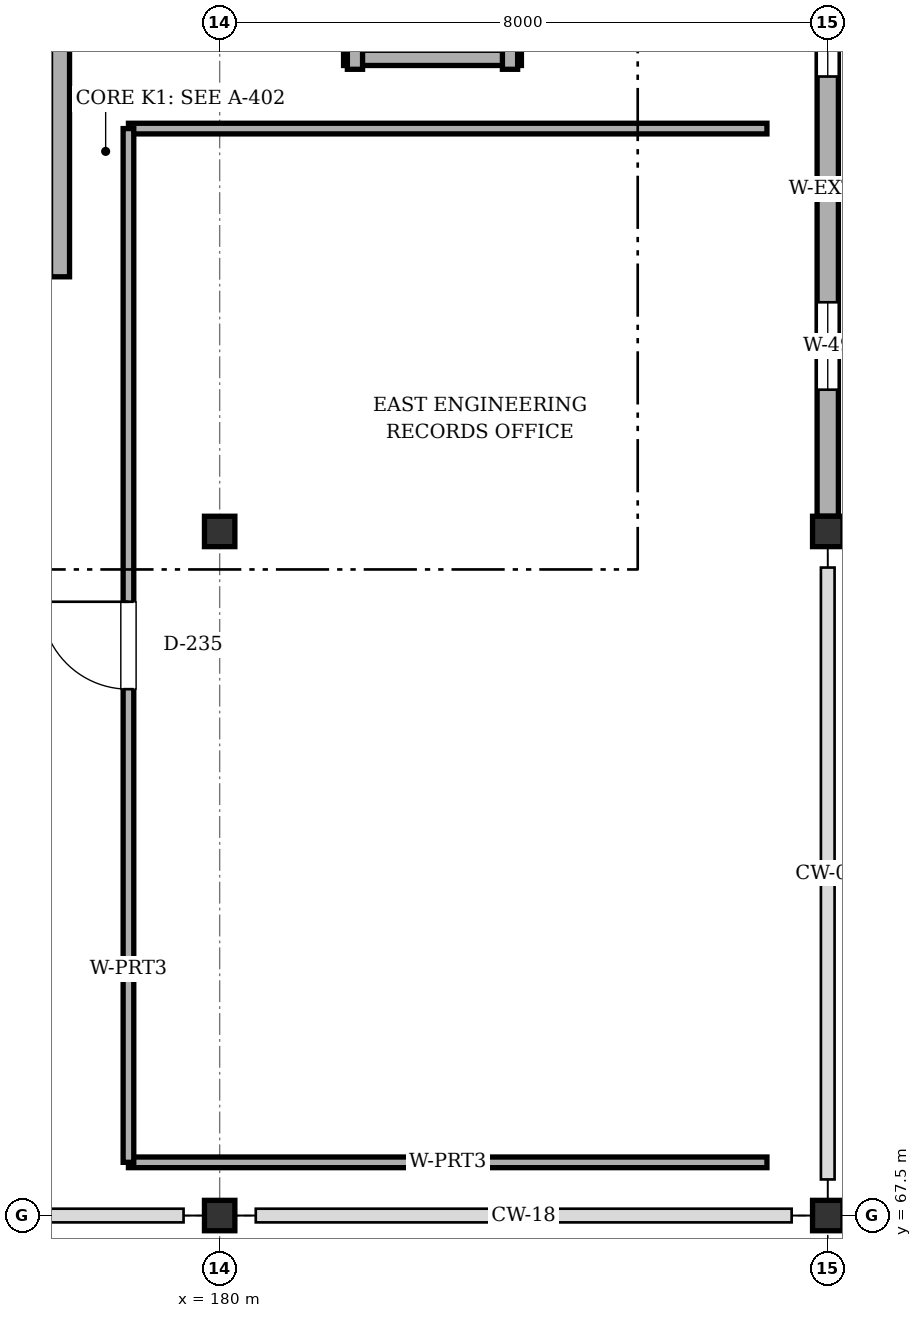
"""IFC4 building model, lengths in metres.
Left out: names, types, materials, properties, quantities, classifications, styles, units other than length and angle.
Written with IfcOpenShell. Run it as: python <this file> out.ifc"""

import sys

from ifc_helpers import new_model, si_unit, direction, frame, frame_2d, origin, origin_2d, place, context, subcontext, project, spatial, rectangle, i_section, extrude, element, fill, save


model = new_model("IFC4")
c1 = context("Model", 3, precision=1e-05, world=origin(), true_north=direction((0.0, 1.0)))
c2 = subcontext(c1, "Body", "Model", "MODEL_VIEW")
j1 = project(units=[si_unit("LENGTHUNIT", "METRE"), si_unit("PLANEANGLEUNIT", "RADIAN")], contexts=[c1])
p1 = place(None, origin())
s1 = spatial("IfcSite", under=j1, at=p1, CompositionType="ELEMENT")
p2 = place(p1, origin())
s2 = spatial("IfcBuilding", under=s1, at=p2, CompositionType="ELEMENT")
p3 = place(p2, frame((0.0, 0.0, 14.4)))
s3 = spatial("IfcBuildingStorey", under=s2, at=p3, CompositionType="ELEMENT", Elevation=14.4)
for number, where, z_axis, x_axis in (
    (1, (180.0, 67.5, 0.0), (0.0, 0.0, 1.0), (1.0, 0.0, 0.0)),
    (2, (180.0, 76.5, 0.0), (0.0, 0.0, 1.0), (1.0, 0.0, 0.0)),
    (3, (188.0, 67.5, 0.0), (0.0, 0.0, 1.0), (1.0, 0.0, 0.0)),
    (4, (188.0, 76.5, 0.0), (0.0, 0.0, 1.0), (1.0, 0.0, 0.0)),
):
    element("IfcColumn", number, at=place(p3, frame(where, z_axis=z_axis, x_axis=x_axis)), inside=s3, PredefinedType="COLUMN", context=c2, shape_type="SweptSolid", body=[
        extrude(i_section(OverallWidth=0.4, OverallDepth=0.4, WebThickness=0.013, FlangeThickness=0.021, FilletRadius=0.022, at=origin_2d()), origin(), (0.0, 0.0, 1.0), 3.2),
    ])
p4 = place(p3, frame((188.0, 85.3, 0.0), z_axis=(0.0, 0.0, 1.0), x_axis=(0.0, -1.0, 0.0)))
e5 = element("IfcWall", 5, at=p4, inside=s3, PredefinedType="SOLIDWALL", context=c2, shape_type="SweptSolid", body=[
    extrude(rectangle(XDim=8.6, YDim=0.28, at=frame_2d((4.3, 0.0))), origin(), (0.0, 0.0, 1.0), 2.485),
])
p5 = place(p4, frame((1.665, 0.0, 0.9)))
e6 = element("IfcOpeningElement", 6, at=p5, cuts=e5, PredefinedType="OPENING", context=c2, shape_type="SweptSolid", body=[
    extrude(rectangle(XDim=1.15, YDim=1.45, at=frame_2d((0.575, 0.725))), frame((0.0, 0.15, 0.0), z_axis=(0.0, -1.0, 0.0), x_axis=(1.0, 0.0, 0.0)), (0.0, 0.0, 1.0), 0.3),
])
p6 = place(p4, frame((5.785, 0.0, 0.9)))
e7 = element("IfcOpeningElement", 7, at=p6, cuts=e5, PredefinedType="OPENING", context=c2, shape_type="SweptSolid", body=[
    extrude(rectangle(XDim=1.15, YDim=1.45, at=frame_2d((0.575, 0.725))), frame((0.0, 0.15, 0.0), z_axis=(0.0, -1.0, 0.0), x_axis=(1.0, 0.0, 0.0)), (0.0, 0.0, 1.0), 0.3),
])
p7 = place(p3, frame((181.63, 82.73, 0.0), z_axis=(0.0, 0.0, 1.0), x_axis=(1.0, 0.0, 0.0)))
e8 = element("IfcWall", 8, at=p7, inside=s3, PredefinedType="SOLIDWALL", context=c2, shape_type="SweptSolid", body=[
    extrude(rectangle(XDim=2.34, YDim=0.2, at=frame_2d((1.17, 0.0))), origin(), (0.0, 0.0, 1.0), 2.975),
])
for number, where, z_axis, x_axis in (
    (9, (181.78, 85.42, 0.0), (0.0, 0.0, 1.0), (0.0, -1.0, 0.0)),
    (10, (183.82, 82.58, 0.0), (0.0, 0.0, 1.0), (0.0, 1.0, 0.0)),
):
    element("IfcWall", number, at=place(p3, frame(where, z_axis=z_axis, x_axis=x_axis)), inside=s3, PredefinedType="SOLIDWALL", context=c2, shape_type="SweptSolid", body=[
        extrude(rectangle(XDim=2.84, YDim=0.2, at=frame_2d((1.42, 0.0))), origin(), (0.0, 0.0, 1.0), 2.535),
    ])
p8 = place(p3, frame((187.2, 68.2, 0.0), z_axis=(0.0, 0.0, 1.0), x_axis=(-1.0, 0.0, 0.0)))
e11 = element("IfcWall", 11, at=p8, inside=s3, PredefinedType="PARTITIONING", context=c2, shape_type="SweptSolid", body=[
    extrude(rectangle(XDim=8.4, YDim=0.14, at=frame_2d((4.2, 0.0))), origin(), (0.0, 0.0, 1.0), 2.485),
])
p9 = place(p3, frame((178.8, 81.8, 0.0), z_axis=(0.0, 0.0, 1.0), x_axis=(1.0, 0.0, 0.0)))
e12 = element("IfcWall", 12, at=p9, inside=s3, PredefinedType="PARTITIONING", context=c2, shape_type="SweptSolid", body=[
    extrude(rectangle(XDim=8.4, YDim=0.14, at=frame_2d((4.2, 0.0))), origin(), (0.0, 0.0, 1.0), 2.515),
])
p10 = place(p3, frame((178.8, 68.2, 0.0), z_axis=(0.0, 0.0, 1.0), x_axis=(0.0, 1.0, 0.0)))
e13 = element("IfcWall", 13, at=p10, inside=s3, PredefinedType="PARTITIONING", context=c2, shape_type="SweptSolid", body=[
    extrude(rectangle(XDim=13.6, YDim=0.14, at=frame_2d((6.8, 0.0))), origin(), (0.0, 0.0, 1.0), 2.505),
])
p11 = place(p10, frame((6.225, 0.0, 0.0)))
e14 = element("IfcOpeningElement", 14, at=p11, cuts=e13, PredefinedType="OPENING", context=c2, shape_type="SweptSolid", body=[
    extrude(rectangle(XDim=1.15, YDim=2.1, at=frame_2d((0.575, 1.05))), frame((0.0, 0.08, 0.0), z_axis=(0.0, -1.0, 0.0), x_axis=(1.0, 0.0, 0.0)), (0.0, 0.0, 1.0), 0.16),
])
p12 = place(p3, frame((177.9, 84.05, 0.0), z_axis=(0.0, 0.0, 1.0), x_axis=(0.0, -1.0, 0.0)))
e15 = element("IfcWall", 15, at=p12, inside=s3, PredefinedType="SOLIDWALL", context=c2, shape_type="SweptSolid", body=[
    extrude(rectangle(XDim=4.2, YDim=0.25, at=frame_2d((2.1, 0.0))), origin(), (0.0, 0.0, 1.0), 2.975),
])
p13 = place(p5, origin())
e16 = element("IfcWindow", 16, at=p13, inside=s3, PartitioningType="SINGLE_PANEL", PredefinedType="WINDOW", context=c2, shape_type="SweptSolid", body=[
    extrude(rectangle(XDim=1.15, YDim=1.45, at=frame_2d((0.575, 0.725))), frame((0.0, 0.03, 0.0), z_axis=(0.0, -1.0, 0.0), x_axis=(1.0, 0.0, 0.0)), (0.0, 0.0, 1.0), 0.06),
])
fill(e6, e16)
p14 = place(p6, origin())
e17 = element("IfcWindow", 17, at=p14, inside=s3, PartitioningType="SINGLE_PANEL", PredefinedType="WINDOW", context=c2, shape_type="SweptSolid", body=[
    extrude(rectangle(XDim=1.15, YDim=1.45, at=frame_2d((0.575, 0.725))), frame((0.0, 0.03, 0.0), z_axis=(0.0, -1.0, 0.0), x_axis=(1.0, 0.0, 0.0)), (0.0, 0.0, 1.0), 0.06),
])
fill(e7, e17)
p15 = place(p11, origin())
e18 = element("IfcDoor", 18, at=p15, inside=s3, OperationType="SINGLE_SWING_RIGHT", PredefinedType="DOOR", context=c2, shape_type="SweptSolid", body=[
    extrude(rectangle(XDim=1.15, YDim=2.1, at=frame_2d((0.575, 1.05))), frame((0.0, 0.025, 0.0), z_axis=(0.0, -1.0, 0.0), x_axis=(1.0, 0.0, 0.0)), (0.0, 0.0, 1.0), 0.05),
])
fill(e14, e18)
save(model, sys.argv[1])
